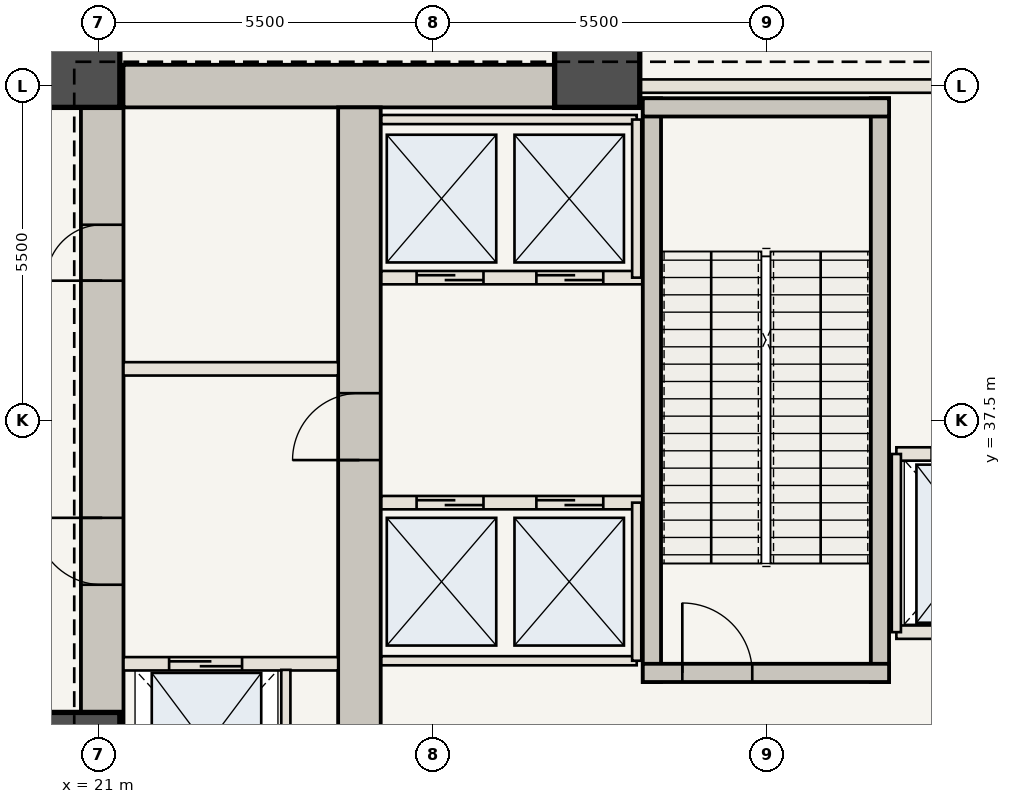
"""IFC4 building model, lengths in metres.
Left out: names, types, materials, properties, quantities, classifications, styles, units other than length and angle.
Written with IfcOpenShell. Run it as: python <this file> out.ifc"""

import sys

from ifc_helpers import new_model, si_unit, direction, frame, frame_2d, origin, origin_2d, place, context, subcontext, project, spatial, rectangle, extrude, element, fill, save


model = new_model("IFC4")
c1 = context("Model", 3, precision=1e-05, world=origin(), true_north=direction((0.0, 1.0)))
c2 = subcontext(c1, "Body", "Model", "MODEL_VIEW")
j1 = project(units=[si_unit("LENGTHUNIT", "METRE"), si_unit("PLANEANGLEUNIT", "RADIAN")], contexts=[c1])
p1 = place(None, origin())
s1 = spatial("IfcSite", under=j1, at=p1, CompositionType="ELEMENT")
p2 = place(p1, origin())
s2 = spatial("IfcBuilding", under=s1, at=p2, CompositionType="ELEMENT")
p3 = place(p2, origin())
s3 = spatial("IfcBuildingStorey", under=s2, at=p3, CompositionType="ELEMENT", Elevation=0.0)
p4 = place(p3, frame((21.06, 30.6, 0.0), z_axis=(0.0, 0.0, 1.0), x_axis=(0.0, 1.0, 0.0)))
e1 = element("IfcWall", 1, at=p4, inside=s3, PredefinedType="SHEAR", context=c2, shape_type="SweptSolid", body=[
    extrude(rectangle(XDim=12.75, YDim=0.7, at=frame_2d((6.375, 0.0))), origin(), (0.0, 0.0, 1.0), 6.65),
])
p5 = place(p4, frame((4.2, 0.0, 0.0)))
e2 = element("IfcOpeningElement", 2, at=p5, cuts=e1, PredefinedType="OPENING", context=c2, shape_type="SweptSolid", body=[
    extrude(rectangle(XDim=1.1, YDim=2.15, at=frame_2d((0.55, 1.075))), frame((0.0, 0.36, 0.0), z_axis=(0.0, -1.0, 0.0), x_axis=(1.0, 0.0, 0.0)), (0.0, 0.0, 1.0), 0.72),
])
p6 = place(p4, frame((9.2, 0.0, 0.0)))
e3 = element("IfcOpeningElement", 3, at=p6, cuts=e1, PredefinedType="OPENING", context=c2, shape_type="SweptSolid", body=[
    extrude(rectangle(XDim=0.92, YDim=2.1, at=frame_2d((0.46, 1.05))), frame((0.0, 0.36, 0.0), z_axis=(0.0, -1.0, 0.0), x_axis=(1.0, 0.0, 0.0)), (0.0, 0.0, 1.0), 0.72),
])
p7 = place(p3, frame((21.41, 43.0, 0.0), z_axis=(0.0, 0.0, 1.0), x_axis=(1.0, 0.0, 0.0)))
e4 = element("IfcWall", 4, at=p7, inside=s3, PredefinedType="SHEAR", context=c2, shape_type="SweptSolid", body=[
    extrude(rectangle(XDim=8.24, YDim=0.7, at=frame_2d((4.12, 0.0))), origin(), (0.0, 0.0, 1.0), 6.65),
])
p8 = place(p3, frame((25.29, 30.6, 0.0), z_axis=(0.0, 0.0, 1.0), x_axis=(0.0, 1.0, 0.0)))
e5 = element("IfcWall", 5, at=p8, inside=s3, PredefinedType="SHEAR", context=c2, shape_type="SweptSolid", body=[
    extrude(rectangle(XDim=12.05, YDim=0.7, at=frame_2d((6.025, 0.0))), origin(), (0.0, 0.0, 1.0), 6.65),
])
p9 = place(p8, frame((6.25, 0.0, 0.0)))
e6 = element("IfcOpeningElement", 6, at=p9, cuts=e5, PredefinedType="OPENING", context=c2, shape_type="SweptSolid", body=[
    extrude(rectangle(XDim=1.1, YDim=2.15, at=frame_2d((0.55, 1.075))), frame((0.0, 0.36, 0.0), z_axis=(0.0, -1.0, 0.0), x_axis=(1.0, 0.0, 0.0)), (0.0, 0.0, 1.0), 0.72),
])
for number, where, z_axis, x_axis in (
    (7, (29.2, 43.35, 0.0), (0.0, 0.0, 1.0), (1.0, 0.0, 0.0)),
    (8, (20.65, 43.35, 0.0), (0.0, 0.0, 1.0), (1.0, 0.0, 0.0)),
    (9, (20.65, 32.0, 0.0), (0.0, 0.0, 1.0), (1.0, 0.0, 0.0)),
):
    element("IfcColumn", number, at=place(p3, frame(where, z_axis=z_axis, x_axis=x_axis)), inside=s3, PredefinedType="COLUMN", context=c2, shape_type="SweptSolid", body=[
        extrude(rectangle(XDim=1.4, YDim=1.4, at=origin_2d()), origin(), (0.0, 0.0, 1.0), 6.65),
    ])
p10 = place(p3, frame((21.41, 33.5, 0.0), z_axis=(0.0, 0.0, 1.0), x_axis=(1.0, 0.0, 0.0)))
e10 = element("IfcWall", 10, at=p10, inside=s3, PredefinedType="STANDARD", context=c2, shape_type="SweptSolid", body=[
    extrude(rectangle(XDim=3.53, YDim=0.22, at=frame_2d((1.765, 0.0))), origin(), (0.0, 0.0, 1.0), 6.41),
])
p11 = place(p10, frame((0.75, 0.0, 0.0)))
e11 = element("IfcOpeningElement", 11, at=p11, cuts=e10, PredefinedType="OPENING", context=c2, shape_type="SweptSolid", body=[
    extrude(rectangle(XDim=1.2, YDim=2.2, at=frame_2d((0.6, 1.1))), frame((0.0, 0.12, 0.0), z_axis=(0.0, -1.0, 0.0), x_axis=(1.0, 0.0, 0.0)), (0.0, 0.0, 1.0), 0.24),
])
p12 = place(p3, frame((24.08, 30.75, 0.0), z_axis=(0.0, 0.0, 1.0), x_axis=(0.0, 1.0, 0.0)))
e12 = element("IfcWall", 12, at=p12, inside=s3, PredefinedType="STANDARD", context=c2, shape_type="SweptSolid", body=[
    extrude(rectangle(XDim=2.65, YDim=0.15, at=frame_2d((1.325, 0.0))), origin(), (0.0, 0.0, 1.0), 6.41),
])
p13 = place(p3, frame((21.41, 38.35, 0.0), z_axis=(0.0, 0.0, 1.0), x_axis=(1.0, 0.0, 0.0)))
e13 = element("IfcWall", 13, at=p13, inside=s3, PredefinedType="STANDARD", context=c2, shape_type="SweptSolid", body=[
    extrude(rectangle(XDim=3.53, YDim=0.22, at=frame_2d((1.765, 0.0))), origin(), (0.0, 0.0, 1.0), 6.41),
])
p14 = place(p3, frame((25.65, 36.15, 0.0), z_axis=(0.0, 0.0, 1.0), x_axis=(1.0, 0.0, 0.0)))
e14 = element("IfcWall", 14, at=p14, inside=s3, PredefinedType="STANDARD", context=c2, shape_type="SweptSolid", body=[
    extrude(rectangle(XDim=4.3, YDim=0.22, at=frame_2d((2.15, 0.0))), origin(), (0.0, 0.0, 1.0), 6.41),
])
p15 = place(p14, frame((0.58, 0.0, 0.0)))
e15 = element("IfcOpeningElement", 15, at=p15, cuts=e14, PredefinedType="OPENING", context=c2, shape_type="SweptSolid", body=[
    extrude(rectangle(XDim=1.1, YDim=2.15, at=frame_2d((0.55, 1.075))), frame((0.0, 0.12, 0.0), z_axis=(0.0, -1.0, 0.0), x_axis=(1.0, 0.0, 0.0)), (0.0, 0.0, 1.0), 0.24),
])
p16 = place(p14, frame((2.55, 0.0, 0.0)))
e16 = element("IfcOpeningElement", 16, at=p16, cuts=e14, PredefinedType="OPENING", context=c2, shape_type="SweptSolid", body=[
    extrude(rectangle(XDim=1.1, YDim=2.15, at=frame_2d((0.55, 1.075))), frame((0.0, 0.12, 0.0), z_axis=(0.0, -1.0, 0.0), x_axis=(1.0, 0.0, 0.0)), (0.0, 0.0, 1.0), 0.24),
])
p17 = place(p3, frame((25.65, 33.55, 0.0), z_axis=(0.0, 0.0, 1.0), x_axis=(1.0, 0.0, 0.0)))
e17 = element("IfcWall", 17, at=p17, inside=s3, PredefinedType="STANDARD", context=c2, shape_type="SweptSolid", body=[
    extrude(rectangle(XDim=4.2, YDim=0.15, at=frame_2d((2.1, 0.0))), origin(), (0.0, 0.0, 1.0), 6.41),
])
p18 = place(p3, frame((29.85, 33.55, 0.0), z_axis=(0.0, 0.0, 1.0), x_axis=(0.0, 1.0, 0.0)))
e18 = element("IfcWall", 18, at=p18, inside=s3, PredefinedType="STANDARD", context=c2, shape_type="SweptSolid", body=[
    extrude(rectangle(XDim=2.6, YDim=0.15, at=frame_2d((1.3, 0.0))), origin(), (0.0, 0.0, 1.0), 6.41),
])
p19 = place(p3, frame((25.65, 39.85, 0.0), z_axis=(0.0, 0.0, 1.0), x_axis=(1.0, 0.0, 0.0)))
e19 = element("IfcWall", 19, at=p19, inside=s3, PredefinedType="STANDARD", context=c2, shape_type="SweptSolid", body=[
    extrude(rectangle(XDim=4.3, YDim=0.22, at=frame_2d((2.15, 0.0))), origin(), (0.0, 0.0, 1.0), 6.41),
])
p20 = place(p19, frame((0.58, 0.0, 0.0)))
e20 = element("IfcOpeningElement", 20, at=p20, cuts=e19, PredefinedType="OPENING", context=c2, shape_type="SweptSolid", body=[
    extrude(rectangle(XDim=1.1, YDim=2.15, at=frame_2d((0.55, 1.075))), frame((0.0, 0.12, 0.0), z_axis=(0.0, -1.0, 0.0), x_axis=(1.0, 0.0, 0.0)), (0.0, 0.0, 1.0), 0.24),
])
p21 = place(p19, frame((2.55, 0.0, 0.0)))
e21 = element("IfcOpeningElement", 21, at=p21, cuts=e19, PredefinedType="OPENING", context=c2, shape_type="SweptSolid", body=[
    extrude(rectangle(XDim=1.1, YDim=2.15, at=frame_2d((0.55, 1.075))), frame((0.0, 0.12, 0.0), z_axis=(0.0, -1.0, 0.0), x_axis=(1.0, 0.0, 0.0)), (0.0, 0.0, 1.0), 0.24),
])
p22 = place(p3, frame((25.65, 42.45, 0.0), z_axis=(0.0, 0.0, 1.0), x_axis=(1.0, 0.0, 0.0)))
e22 = element("IfcWall", 22, at=p22, inside=s3, PredefinedType="STANDARD", context=c2, shape_type="SweptSolid", body=[
    extrude(rectangle(XDim=4.2, YDim=0.15, at=frame_2d((2.1, 0.0))), origin(), (0.0, 0.0, 1.0), 6.41),
])
p23 = place(p3, frame((29.85, 39.85, 0.0), z_axis=(0.0, 0.0, 1.0), x_axis=(0.0, 1.0, 0.0)))
e23 = element("IfcWall", 23, at=p23, inside=s3, PredefinedType="STANDARD", context=c2, shape_type="SweptSolid", body=[
    extrude(rectangle(XDim=2.6, YDim=0.15, at=frame_2d((1.3, 0.0))), origin(), (0.0, 0.0, 1.0), 6.41),
])
for number, where, z_axis, x_axis in (
    (24, (30.1, 33.2, 0.0), (0.0, 0.0, 1.0), (0.0, 1.0, 0.0)),
    (25, (33.85, 33.2, 0.0), (0.0, 0.0, 1.0), (0.0, 1.0, 0.0)),
):
    element("IfcWall", number, at=place(p3, frame(where, z_axis=z_axis, x_axis=x_axis)), inside=s3, PredefinedType="SHEAR", context=c2, shape_type="SweptSolid", body=[
        extrude(rectangle(XDim=9.6, YDim=0.3, at=frame_2d((4.8, 0.0))), origin(), (0.0, 0.0, 1.0), 6.41),
    ])
p24 = place(p3, frame((29.95, 33.35, 0.0), z_axis=(0.0, 0.0, 1.0), x_axis=(1.0, 0.0, 0.0)))
e26 = element("IfcWall", 26, at=p24, inside=s3, PredefinedType="SHEAR", context=c2, shape_type="SweptSolid", body=[
    extrude(rectangle(XDim=4.05, YDim=0.3, at=frame_2d((2.025, 0.0))), origin(), (0.0, 0.0, 1.0), 6.41),
])
p25 = place(p24, frame((0.65, 0.0, 0.0)))
e27 = element("IfcOpeningElement", 27, at=p25, cuts=e26, PredefinedType="OPENING", context=c2, shape_type="SweptSolid", body=[
    extrude(rectangle(XDim=1.15, YDim=2.15, at=frame_2d((0.575, 1.075))), frame((0.0, 0.16, 0.0), z_axis=(0.0, -1.0, 0.0), x_axis=(1.0, 0.0, 0.0)), (0.0, 0.0, 1.0), 0.32),
])
p26 = place(p3, frame((29.95, 42.65, 0.0), z_axis=(0.0, 0.0, 1.0), x_axis=(1.0, 0.0, 0.0)))
e28 = element("IfcWall", 28, at=p26, inside=s3, PredefinedType="SHEAR", context=c2, shape_type="SweptSolid", body=[
    extrude(rectangle(XDim=4.05, YDim=0.3, at=frame_2d((2.025, 0.0))), origin(), (0.0, 0.0, 1.0), 6.41),
])
p27 = place(p3, frame((29.65, 43.0, 0.0), z_axis=(0.0, 0.0, 1.0), x_axis=(1.0, 0.0, 0.0)))
e29 = element("IfcWall", 29, at=p27, inside=s3, PredefinedType="STANDARD", context=c2, shape_type="SweptSolid", body=[
    extrude(rectangle(XDim=8.1, YDim=0.22, at=frame_2d((4.05, 0.0))), origin(), (0.0, 0.0, 1.0), 6.41),
])
p28 = place(p27, frame((5.95, 0.0, 0.0)))
e30 = element("IfcOpeningElement", 30, at=p28, cuts=e29, PredefinedType="OPENING", context=c2, shape_type="SweptSolid", body=[
    extrude(rectangle(XDim=1.1, YDim=2.15, at=frame_2d((0.55, 1.075))), frame((0.0, 0.12, 0.0), z_axis=(0.0, -1.0, 0.0), x_axis=(1.0, 0.0, 0.0)), (0.0, 0.0, 1.0), 0.24),
])
p29 = place(p3, frame((34.12, 36.95, 0.0), z_axis=(0.0, 0.0, 1.0), x_axis=(1.0, 0.0, 0.0)))
e31 = element("IfcWall", 31, at=p29, inside=s3, PredefinedType="STANDARD", context=c2, shape_type="SweptSolid", body=[
    extrude(rectangle(XDim=2.68, YDim=0.22, at=frame_2d((1.34, 0.0))), origin(), (0.0, 0.0, 1.0), 6.41),
])
p30 = place(p29, frame((0.58, 0.0, 0.0)))
e32 = element("IfcOpeningElement", 32, at=p30, cuts=e31, PredefinedType="OPENING", context=c2, shape_type="SweptSolid", body=[
    extrude(rectangle(XDim=1.2, YDim=2.2, at=frame_2d((0.6, 1.1))), frame((0.0, 0.12, 0.0), z_axis=(0.0, -1.0, 0.0), x_axis=(1.0, 0.0, 0.0)), (0.0, 0.0, 1.0), 0.24),
])
p31 = place(p3, frame((34.12, 34.02, 0.0), z_axis=(0.0, 0.0, 1.0), x_axis=(1.0, 0.0, 0.0)))
e33 = element("IfcWall", 33, at=p31, inside=s3, PredefinedType="STANDARD", context=c2, shape_type="SweptSolid", body=[
    extrude(rectangle(XDim=2.68, YDim=0.22, at=frame_2d((1.34, 0.0))), origin(), (0.0, 0.0, 1.0), 6.41),
])
p32 = place(p3, frame((34.12, 34.02, 0.0), z_axis=(0.0, 0.0, 1.0), x_axis=(0.0, 1.0, 0.0)))
e34 = element("IfcWall", 34, at=p32, inside=s3, PredefinedType="STANDARD", context=c2, shape_type="SweptSolid", body=[
    extrude(rectangle(XDim=2.93, YDim=0.15, at=frame_2d((1.465, 0.0))), origin(), (0.0, 0.0, 1.0), 6.41),
])
p33 = place(p5, origin())
e35 = element("IfcDoor", 35, at=p33, inside=s3, OperationType="SINGLE_SWING_RIGHT", PredefinedType="DOOR", context=c2, shape_type="SweptSolid", body=[
    extrude(rectangle(XDim=1.1, YDim=2.15, at=frame_2d((0.55, 1.075))), frame((0.0, 0.025, 0.0), z_axis=(0.0, -1.0, 0.0), x_axis=(1.0, 0.0, 0.0)), (0.0, 0.0, 1.0), 0.05),
])
fill(e2, e35)
p34 = place(p9, origin())
e36 = element("IfcDoor", 36, at=p34, inside=s3, OperationType="SINGLE_SWING_LEFT", PredefinedType="DOOR", context=c2, shape_type="SweptSolid", body=[
    extrude(rectangle(XDim=1.1, YDim=2.15, at=frame_2d((0.55, 1.075))), frame((0.0, 0.025, 0.0), z_axis=(0.0, -1.0, 0.0), x_axis=(1.0, 0.0, 0.0)), (0.0, 0.0, 1.0), 0.05),
])
fill(e6, e36)
p35 = place(p6, origin())
e37 = element("IfcDoor", 37, at=p35, inside=s3, OperationType="SINGLE_SWING_LEFT", PredefinedType="DOOR", context=c2, shape_type="SweptSolid", body=[
    extrude(rectangle(XDim=0.92, YDim=2.1, at=frame_2d((0.46, 1.05))), frame((0.0, 0.025, 0.0), z_axis=(0.0, -1.0, 0.0), x_axis=(1.0, 0.0, 0.0)), (0.0, 0.0, 1.0), 0.05),
])
fill(e3, e37)
p36 = place(p11, origin())
e38 = element("IfcDoor", 38, at=p36, inside=s3, OperationType="DOUBLE_DOOR_SLIDING", PredefinedType="DOOR", context=c2, shape_type="SweptSolid", body=[
    extrude(rectangle(XDim=1.2, YDim=2.2, at=frame_2d((0.6, 1.1))), frame((0.0, 0.025, 0.0), z_axis=(0.0, -1.0, 0.0), x_axis=(1.0, 0.0, 0.0)), (0.0, 0.0, 1.0), 0.05),
])
fill(e11, e38)
p37 = place(p15, origin())
e39 = element("IfcDoor", 39, at=p37, inside=s3, OperationType="DOUBLE_DOOR_SLIDING", PredefinedType="DOOR", context=c2, shape_type="SweptSolid", body=[
    extrude(rectangle(XDim=1.1, YDim=2.15, at=frame_2d((0.55, 1.075))), frame((0.0, 0.025, 0.0), z_axis=(0.0, -1.0, 0.0), x_axis=(1.0, 0.0, 0.0)), (0.0, 0.0, 1.0), 0.05),
])
fill(e15, e39)
p38 = place(p16, origin())
e40 = element("IfcDoor", 40, at=p38, inside=s3, OperationType="DOUBLE_DOOR_SLIDING", PredefinedType="DOOR", context=c2, shape_type="SweptSolid", body=[
    extrude(rectangle(XDim=1.1, YDim=2.15, at=frame_2d((0.55, 1.075))), frame((0.0, 0.025, 0.0), z_axis=(0.0, -1.0, 0.0), x_axis=(1.0, 0.0, 0.0)), (0.0, 0.0, 1.0), 0.05),
])
fill(e16, e40)
p39 = place(p20, origin())
e41 = element("IfcDoor", 41, at=p39, inside=s3, OperationType="DOUBLE_DOOR_SLIDING", PredefinedType="DOOR", context=c2, shape_type="SweptSolid", body=[
    extrude(rectangle(XDim=1.1, YDim=2.15, at=frame_2d((0.55, 1.075))), frame((0.0, 0.025, 0.0), z_axis=(0.0, -1.0, 0.0), x_axis=(1.0, 0.0, 0.0)), (0.0, 0.0, 1.0), 0.05),
])
fill(e20, e41)
p40 = place(p21, origin())
e42 = element("IfcDoor", 42, at=p40, inside=s3, OperationType="DOUBLE_DOOR_SLIDING", PredefinedType="DOOR", context=c2, shape_type="SweptSolid", body=[
    extrude(rectangle(XDim=1.1, YDim=2.15, at=frame_2d((0.55, 1.075))), frame((0.0, 0.025, 0.0), z_axis=(0.0, -1.0, 0.0), x_axis=(1.0, 0.0, 0.0)), (0.0, 0.0, 1.0), 0.05),
])
fill(e21, e42)
p41 = place(p25, origin())
e43 = element("IfcDoor", 43, at=p41, inside=s3, OperationType="SINGLE_SWING_LEFT", PredefinedType="DOOR", context=c2, shape_type="SweptSolid", body=[
    extrude(rectangle(XDim=1.15, YDim=2.15, at=frame_2d((0.575, 1.075))), frame((0.0, 0.025, 0.0), z_axis=(0.0, -1.0, 0.0), x_axis=(1.0, 0.0, 0.0)), (0.0, 0.0, 1.0), 0.05),
])
fill(e27, e43)
save(model, sys.argv[1])
